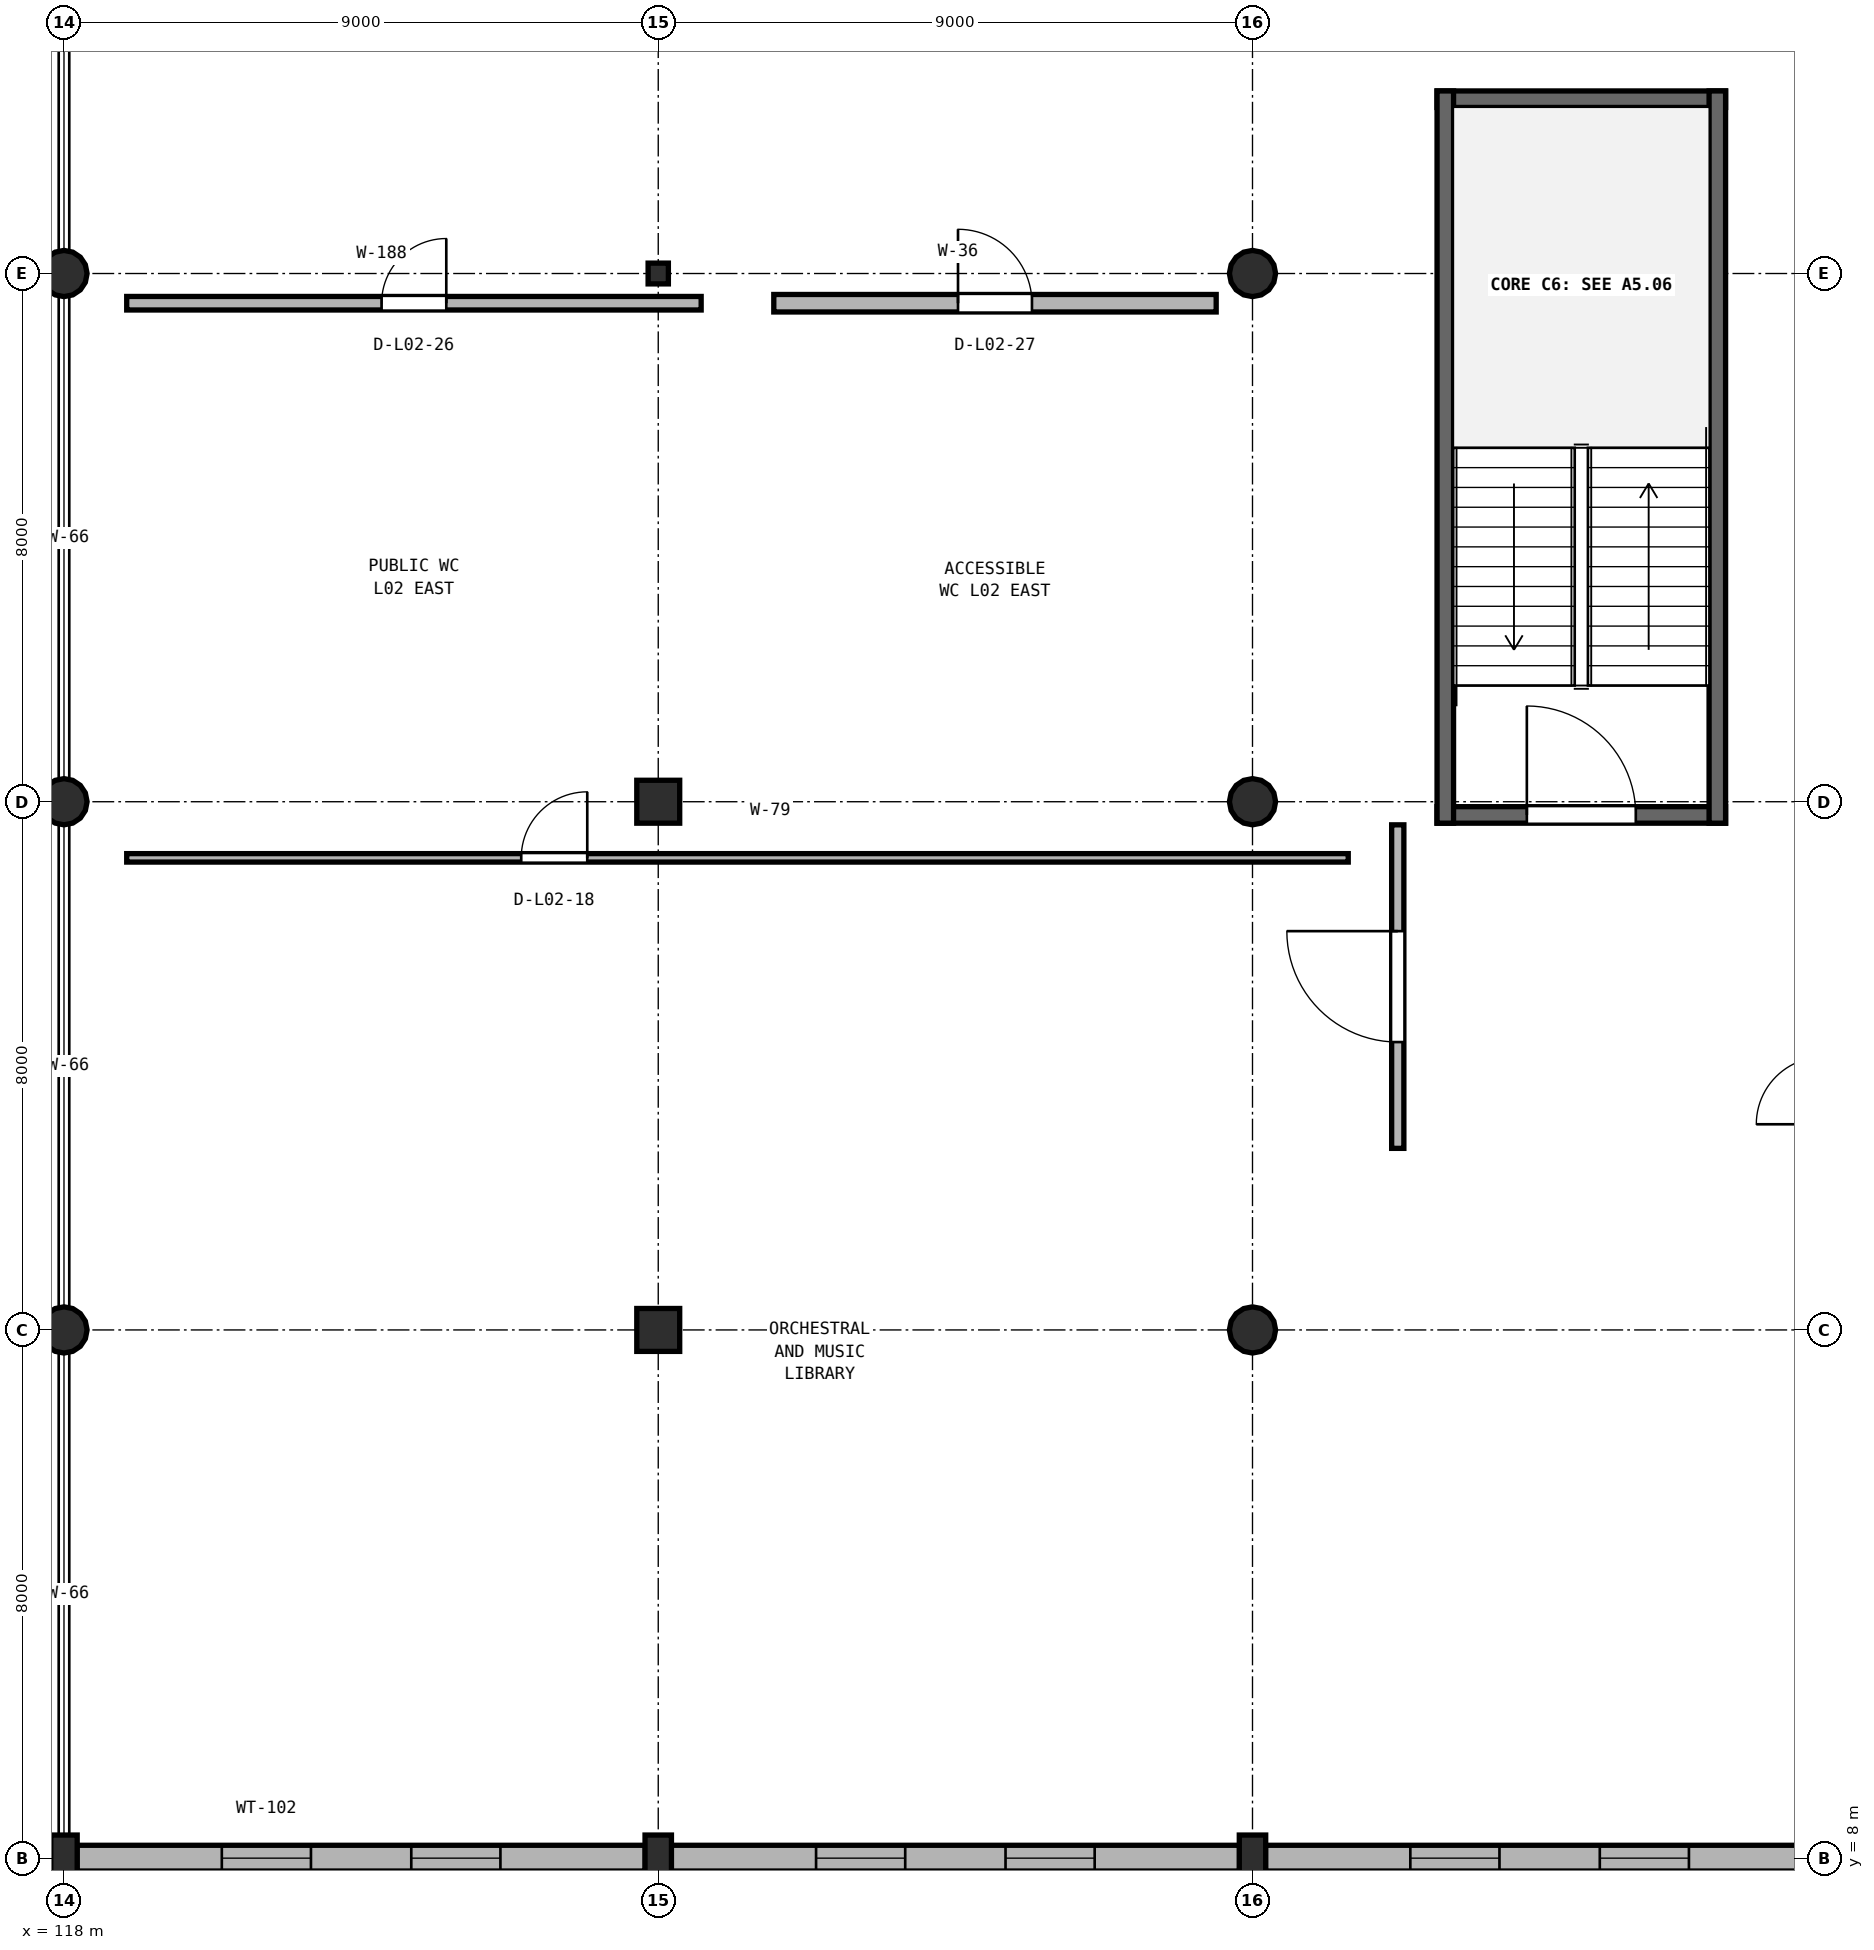
"""IFC4 building model, lengths in metres.
Left out: names, types, materials, properties, quantities, classifications, styles, units other than length and angle.
Written with IfcOpenShell. Run it as: python <this file> out.ifc"""

import sys

from ifc_helpers import new_model, si_unit, direction, frame, frame_2d, origin, origin_2d, place, context, subcontext, project, spatial, rectangle, circle, i_section, extrude, element, fill, save


model = new_model("IFC4")
c1 = context("Model", 3, precision=1e-05, world=origin(), true_north=direction((0.0, 1.0)))
c2 = subcontext(c1, "Body", "Model", "MODEL_VIEW")
j1 = project(units=[si_unit("LENGTHUNIT", "METRE"), si_unit("PLANEANGLEUNIT", "RADIAN")], contexts=[c1])
p1 = place(None, origin())
s1 = spatial("IfcSite", under=j1, at=p1, CompositionType="ELEMENT")
p2 = place(p1, origin())
s2 = spatial("IfcBuilding", under=s1, at=p2, CompositionType="ELEMENT")
p3 = place(p2, frame((0.0, 0.0, 10.2)))
s3 = spatial("IfcBuildingStorey", under=s2, at=p3, CompositionType="ELEMENT", Elevation=10.2)
p4 = place(p3, frame((118.0, 8.0, 0.0), z_axis=(0.0, 0.0, 1.0), x_axis=(1.0, 0.0, 0.0)))
e1 = element("IfcColumn", 1, at=p4, inside=s3, PredefinedType="PILASTER", context=c2, shape_type="SweptSolid", body=[
    extrude(rectangle(XDim=0.4, YDim=0.7, at=origin_2d()), origin(), (0.0, 0.0, 1.0), 4.24),
])
for number, where, z_axis, x_axis in (
    (2, (118.0, 16.0, 0.0), (0.0, 0.0, 1.0), (1.0, 0.0, 0.0)),
    (3, (118.0, 24.0, 0.0), (0.0, 0.0, 1.0), (1.0, 0.0, 0.0)),
    (4, (118.0, 32.0, 0.0), (0.0, 0.0, 1.0), (1.0, 0.0, 0.0)),
):
    element("IfcColumn", number, at=place(p3, frame(where, z_axis=z_axis, x_axis=x_axis)), inside=s3, PredefinedType="COLUMN", context=c2, shape_type="SweptSolid", body=[
        extrude(circle(Radius=0.35, at=origin_2d()), origin(), (0.0, 0.0, 1.0), 4.24),
    ])
p5 = place(p3, frame((127.0, 8.0, 0.0), z_axis=(0.0, 0.0, 1.0), x_axis=(1.0, 0.0, 0.0)))
e5 = element("IfcColumn", 5, at=p5, inside=s3, PredefinedType="PILASTER", context=c2, shape_type="SweptSolid", body=[
    extrude(rectangle(XDim=0.4, YDim=0.7, at=origin_2d()), origin(), (0.0, 0.0, 1.0), 4.24),
])
for number, where, z_axis, x_axis in (
    (6, (127.0, 16.0, 0.0), (0.0, 0.0, 1.0), (1.0, 0.0, 0.0)),
    (7, (127.0, 24.0, 0.0), (0.0, 0.0, 1.0), (1.0, 0.0, 0.0)),
):
    element("IfcColumn", number, at=place(p3, frame(where, z_axis=z_axis, x_axis=x_axis)), inside=s3, PredefinedType="COLUMN", context=c2, shape_type="SweptSolid", body=[
        extrude(rectangle(XDim=0.65, YDim=0.65, at=origin_2d()), origin(), (0.0, 0.0, 1.0), 4.24),
    ])
p6 = place(p3, frame((127.0, 32.0, 0.0), z_axis=(0.0, 0.0, 1.0), x_axis=(1.0, 0.0, 0.0)))
e8 = element("IfcColumn", 8, at=p6, inside=s3, PredefinedType="COLUMN", context=c2, shape_type="SweptSolid", body=[
    extrude(i_section(OverallWidth=0.307, OverallDepth=0.315, WebThickness=0.012, FlangeThickness=0.019, FilletRadius=0.017, at=origin_2d()), origin(), (0.0, 0.0, 1.0), 4.24),
])
p7 = place(p3, frame((136.0, 8.0, 0.0), z_axis=(0.0, 0.0, 1.0), x_axis=(1.0, 0.0, 0.0)))
e9 = element("IfcColumn", 9, at=p7, inside=s3, PredefinedType="PILASTER", context=c2, shape_type="SweptSolid", body=[
    extrude(rectangle(XDim=0.4, YDim=0.7, at=origin_2d()), origin(), (0.0, 0.0, 1.0), 4.24),
])
for number, where, z_axis, x_axis in (
    (10, (136.0, 16.0, 0.0), (0.0, 0.0, 1.0), (1.0, 0.0, 0.0)),
    (11, (136.0, 24.0, 0.0), (0.0, 0.0, 1.0), (1.0, 0.0, 0.0)),
    (12, (136.0, 32.0, 0.0), (0.0, 0.0, 1.0), (1.0, 0.0, 0.0)),
):
    element("IfcColumn", number, at=place(p3, frame(where, z_axis=z_axis, x_axis=x_axis)), inside=s3, PredefinedType="COLUMN", context=c2, shape_type="SweptSolid", body=[
        extrude(circle(Radius=0.35, at=origin_2d()), origin(), (0.0, 0.0, 1.0), 4.24),
    ])
p8 = place(p3, frame((118.196, 8.0, 0.0), z_axis=(0.0, 0.0, 1.0), x_axis=(1.0, 0.0, 0.0)))
e13 = element("IfcWall", 13, at=p8, inside=s3, PredefinedType="SOLIDWALL", context=c2, shape_type="SweptSolid", body=[
    extrude(rectangle(XDim=8.608, YDim=0.39, at=frame_2d((4.304, 0.0))), origin(), (0.0, 0.0, 1.0), 3.852),
])
p9 = place(p8, frame((2.194, 0.0, 0.75)))
e14 = element("IfcOpeningElement", 14, at=p9, cuts=e13, PredefinedType="OPENING", context=c2, shape_type="SweptSolid", body=[
    extrude(rectangle(XDim=1.35, YDim=2.15, at=frame_2d((0.675, 1.075))), frame((0.0, 0.205, 0.0), z_axis=(0.0, -1.0, 0.0), x_axis=(1.0, 0.0, 0.0)), (0.0, 0.0, 1.0), 0.41),
])
p10 = place(p8, frame((5.064, 0.0, 0.75)))
e15 = element("IfcOpeningElement", 15, at=p10, cuts=e13, PredefinedType="OPENING", context=c2, shape_type="SweptSolid", body=[
    extrude(rectangle(XDim=1.35, YDim=2.15, at=frame_2d((0.675, 1.075))), frame((0.0, 0.205, 0.0), z_axis=(0.0, -1.0, 0.0), x_axis=(1.0, 0.0, 0.0)), (0.0, 0.0, 1.0), 0.41),
])
p11 = place(p3, frame((127.196, 8.0, 0.0), z_axis=(0.0, 0.0, 1.0), x_axis=(1.0, 0.0, 0.0)))
e16 = element("IfcWall", 16, at=p11, inside=s3, PredefinedType="SOLIDWALL", context=c2, shape_type="SweptSolid", body=[
    extrude(rectangle(XDim=8.608, YDim=0.39, at=frame_2d((4.304, 0.0))), origin(), (0.0, 0.0, 1.0), 3.852),
])
p12 = place(p11, frame((2.194, 0.0, 0.75)))
e17 = element("IfcOpeningElement", 17, at=p12, cuts=e16, PredefinedType="OPENING", context=c2, shape_type="SweptSolid", body=[
    extrude(rectangle(XDim=1.35, YDim=2.15, at=frame_2d((0.675, 1.075))), frame((0.0, 0.205, 0.0), z_axis=(0.0, -1.0, 0.0), x_axis=(1.0, 0.0, 0.0)), (0.0, 0.0, 1.0), 0.41),
])
p13 = place(p11, frame((5.064, 0.0, 0.75)))
e18 = element("IfcOpeningElement", 18, at=p13, cuts=e16, PredefinedType="OPENING", context=c2, shape_type="SweptSolid", body=[
    extrude(rectangle(XDim=1.35, YDim=2.15, at=frame_2d((0.675, 1.075))), frame((0.0, 0.205, 0.0), z_axis=(0.0, -1.0, 0.0), x_axis=(1.0, 0.0, 0.0)), (0.0, 0.0, 1.0), 0.41),
])
p14 = place(p3, frame((136.196, 8.0, 0.0), z_axis=(0.0, 0.0, 1.0), x_axis=(1.0, 0.0, 0.0)))
e19 = element("IfcWall", 19, at=p14, inside=s3, PredefinedType="SOLIDWALL", context=c2, shape_type="SweptSolid", body=[
    extrude(rectangle(XDim=8.608, YDim=0.39, at=frame_2d((4.304, 0.0))), origin(), (0.0, 0.0, 1.0), 3.852),
])
p15 = place(p14, frame((2.194, 0.0, 0.75)))
e20 = element("IfcOpeningElement", 20, at=p15, cuts=e19, PredefinedType="OPENING", context=c2, shape_type="SweptSolid", body=[
    extrude(rectangle(XDim=1.35, YDim=2.15, at=frame_2d((0.675, 1.075))), frame((0.0, 0.205, 0.0), z_axis=(0.0, -1.0, 0.0), x_axis=(1.0, 0.0, 0.0)), (0.0, 0.0, 1.0), 0.41),
])
p16 = place(p14, frame((5.064, 0.0, 0.75)))
e21 = element("IfcOpeningElement", 21, at=p16, cuts=e19, PredefinedType="OPENING", context=c2, shape_type="SweptSolid", body=[
    extrude(rectangle(XDim=1.35, YDim=2.15, at=frame_2d((0.675, 1.075))), frame((0.0, 0.205, 0.0), z_axis=(0.0, -1.0, 0.0), x_axis=(1.0, 0.0, 0.0)), (0.0, 0.0, 1.0), 0.41),
])
p17 = place(p3, frame((138.795, 23.8, 0.0), z_axis=(0.0, 0.0, 1.0), x_axis=(1.0, 0.0, 0.0)))
e22 = element("IfcWall", 22, at=p17, inside=s3, PredefinedType="SHEAR", context=c2, shape_type="SweptSolid", body=[
    extrude(rectangle(XDim=4.37, YDim=0.25, at=frame_2d((2.185, 0.0))), origin(), (0.0, 0.0, 1.0), 4.24),
])
p18 = place(p17, frame((1.36, 0.0, 0.0)))
e23 = element("IfcOpeningElement", 23, at=p18, cuts=e22, PredefinedType="OPENING", context=c2, shape_type="SweptSolid", body=[
    extrude(rectangle(XDim=1.65, YDim=2.22, at=frame_2d((0.825, 1.11))), frame((0.0, 0.135, 0.0), z_axis=(0.0, -1.0, 0.0), x_axis=(1.0, 0.0, 0.0)), (0.0, 0.0, 1.0), 0.27),
])
p19 = place(p3, frame((138.795, 34.64, 0.0), z_axis=(0.0, 0.0, 1.0), x_axis=(1.0, 0.0, 0.0)))
e24 = element("IfcWall", 24, at=p19, inside=s3, PredefinedType="SHEAR", context=c2, shape_type="SweptSolid", body=[
    extrude(rectangle(XDim=4.37, YDim=0.25, at=frame_2d((2.185, 0.0))), origin(), (0.0, 0.0, 1.0), 4.24),
])
for number, where, z_axis, x_axis in (
    (25, (138.92, 23.675, 0.0), (0.0, 0.0, 1.0), (0.0, 1.0, 0.0)),
    (26, (143.04, 23.675, 0.0), (0.0, 0.0, 1.0), (0.0, 1.0, 0.0)),
):
    element("IfcWall", number, at=place(p3, frame(where, z_axis=z_axis, x_axis=x_axis)), inside=s3, PredefinedType="SHEAR", context=c2, shape_type="SweptSolid", body=[
        extrude(rectangle(XDim=11.09, YDim=0.25, at=frame_2d((5.545, 0.0))), origin(), (0.0, 0.0, 1.0), 4.24),
    ])
p20 = place(p3, frame((138.2, 18.75, 0.0), z_axis=(0.0, 0.0, 1.0), x_axis=(0.0, 1.0, 0.0)))
e27 = element("IfcWall", 27, at=p20, inside=s3, PredefinedType="PARTITIONING", context=c2, shape_type="SweptSolid", body=[
    extrude(rectangle(XDim=4.9, YDim=0.185, at=frame_2d((2.45, 0.0))), origin(), (0.0, 0.0, 1.0), 4.19),
])
p21 = place(p20, frame((1.61, 0.0, 0.0)))
e28 = element("IfcOpeningElement", 28, at=p21, cuts=e27, PredefinedType="OPENING", context=c2, shape_type="SweptSolid", body=[
    extrude(rectangle(XDim=1.68, YDim=2.25, at=frame_2d((0.84, 1.125))), frame((0.0, 0.103, 0.0), z_axis=(0.0, -1.0, 0.0), x_axis=(1.0, 0.0, 0.0)), (0.0, 0.0, 1.0), 0.205),
])
p22 = place(p3, frame((118.95, 23.15, 0.0), z_axis=(0.0, 0.0, 1.0), x_axis=(1.0, 0.0, 0.0)))
e29 = element("IfcWall", 29, at=p22, inside=s3, PredefinedType="PARTITIONING", context=c2, shape_type="SweptSolid", body=[
    extrude(rectangle(XDim=18.5, YDim=0.128, at=frame_2d((9.25, 0.0))), origin(), (0.0, 0.0, 1.0), 4.19),
])
p23 = place(p22, frame((5.975, 0.0, 0.0)))
e30 = element("IfcOpeningElement", 30, at=p23, cuts=e29, PredefinedType="OPENING", context=c2, shape_type="SweptSolid", body=[
    extrude(rectangle(XDim=1.0, YDim=2.15, at=frame_2d((0.5, 1.075))), frame((0.0, 0.074, 0.0), z_axis=(0.0, -1.0, 0.0), x_axis=(1.0, 0.0, 0.0)), (0.0, 0.0, 1.0), 0.148),
])
p24 = place(p3, frame((118.95, 31.55, 0.0), z_axis=(0.0, 0.0, 1.0), x_axis=(1.0, 0.0, 0.0)))
e31 = element("IfcWall", 31, at=p24, inside=s3, PredefinedType="PLUMBINGWALL", context=c2, shape_type="SweptSolid", body=[
    extrude(rectangle(XDim=8.7, YDim=0.205, at=frame_2d((4.35, 0.0))), origin(), (0.0, 0.0, 1.0), 3.603),
])
p25 = place(p24, frame((3.86, 0.0, 0.0)))
e32 = element("IfcOpeningElement", 32, at=p25, cuts=e31, PredefinedType="OPENING", context=c2, shape_type="SweptSolid", body=[
    extrude(rectangle(XDim=0.98, YDim=2.14, at=frame_2d((0.49, 1.07))), frame((0.0, 0.113, 0.0), z_axis=(0.0, -1.0, 0.0), x_axis=(1.0, 0.0, 0.0)), (0.0, 0.0, 1.0), 0.225),
])
p26 = place(p3, frame((128.75, 31.55, 0.0), z_axis=(0.0, 0.0, 1.0), x_axis=(1.0, 0.0, 0.0)))
e33 = element("IfcWall", 33, at=p26, inside=s3, PredefinedType="PLUMBINGWALL", context=c2, shape_type="SweptSolid", body=[
    extrude(rectangle(XDim=6.7, YDim=0.265, at=frame_2d((3.35, 0.0))), origin(), (0.0, 0.0, 1.0), 3.603),
])
p27 = place(p26, frame((2.79, 0.0, 0.0)))
e34 = element("IfcOpeningElement", 34, at=p27, cuts=e33, PredefinedType="OPENING", context=c2, shape_type="SweptSolid", body=[
    extrude(rectangle(XDim=1.12, YDim=2.16, at=frame_2d((0.56, 1.08))), frame((0.0, 0.142, 0.0), z_axis=(0.0, -1.0, 0.0), x_axis=(1.0, 0.0, 0.0)), (0.0, 0.0, 1.0), 0.285),
])
p28 = place(p9, origin())
e35 = element("IfcWindow", 35, at=p28, inside=s3, PartitioningType="SINGLE_PANEL", PredefinedType="WINDOW", context=c2, shape_type="SweptSolid", body=[
    extrude(rectangle(XDim=1.35, YDim=2.15, at=frame_2d((0.675, 1.075))), frame((0.0, 0.03, 0.0), z_axis=(0.0, -1.0, 0.0), x_axis=(1.0, 0.0, 0.0)), (0.0, 0.0, 1.0), 0.06),
])
fill(e14, e35)
p29 = place(p10, origin())
e36 = element("IfcWindow", 36, at=p29, inside=s3, PartitioningType="SINGLE_PANEL", PredefinedType="WINDOW", context=c2, shape_type="SweptSolid", body=[
    extrude(rectangle(XDim=1.35, YDim=2.15, at=frame_2d((0.675, 1.075))), frame((0.0, 0.03, 0.0), z_axis=(0.0, -1.0, 0.0), x_axis=(1.0, 0.0, 0.0)), (0.0, 0.0, 1.0), 0.06),
])
fill(e15, e36)
p30 = place(p12, origin())
e37 = element("IfcWindow", 37, at=p30, inside=s3, PartitioningType="SINGLE_PANEL", PredefinedType="WINDOW", context=c2, shape_type="SweptSolid", body=[
    extrude(rectangle(XDim=1.35, YDim=2.15, at=frame_2d((0.675, 1.075))), frame((0.0, 0.03, 0.0), z_axis=(0.0, -1.0, 0.0), x_axis=(1.0, 0.0, 0.0)), (0.0, 0.0, 1.0), 0.06),
])
fill(e17, e37)
p31 = place(p13, origin())
e38 = element("IfcWindow", 38, at=p31, inside=s3, PartitioningType="SINGLE_PANEL", PredefinedType="WINDOW", context=c2, shape_type="SweptSolid", body=[
    extrude(rectangle(XDim=1.35, YDim=2.15, at=frame_2d((0.675, 1.075))), frame((0.0, 0.03, 0.0), z_axis=(0.0, -1.0, 0.0), x_axis=(1.0, 0.0, 0.0)), (0.0, 0.0, 1.0), 0.06),
])
fill(e18, e38)
p32 = place(p15, origin())
e39 = element("IfcWindow", 39, at=p32, inside=s3, PartitioningType="SINGLE_PANEL", PredefinedType="WINDOW", context=c2, shape_type="SweptSolid", body=[
    extrude(rectangle(XDim=1.35, YDim=2.15, at=frame_2d((0.675, 1.075))), frame((0.0, 0.03, 0.0), z_axis=(0.0, -1.0, 0.0), x_axis=(1.0, 0.0, 0.0)), (0.0, 0.0, 1.0), 0.06),
])
fill(e20, e39)
p33 = place(p16, origin())
e40 = element("IfcWindow", 40, at=p33, inside=s3, PartitioningType="SINGLE_PANEL", PredefinedType="WINDOW", context=c2, shape_type="SweptSolid", body=[
    extrude(rectangle(XDim=1.35, YDim=2.15, at=frame_2d((0.675, 1.075))), frame((0.0, 0.03, 0.0), z_axis=(0.0, -1.0, 0.0), x_axis=(1.0, 0.0, 0.0)), (0.0, 0.0, 1.0), 0.06),
])
fill(e21, e40)
p34 = place(p18, origin())
e41 = element("IfcDoor", 41, at=p34, inside=s3, OperationType="SINGLE_SWING_LEFT", PredefinedType="DOOR", context=c2, shape_type="SweptSolid", body=[
    extrude(rectangle(XDim=1.65, YDim=2.22, at=frame_2d((0.825, 1.11))), frame((0.0, 0.025, 0.0), z_axis=(0.0, -1.0, 0.0), x_axis=(1.0, 0.0, 0.0)), (0.0, 0.0, 1.0), 0.05),
])
fill(e23, e41)
p35 = place(p21, origin())
e42 = element("IfcDoor", 42, at=p35, inside=s3, OperationType="SINGLE_SWING_RIGHT", PredefinedType="DOOR", context=c2, shape_type="SweptSolid", body=[
    extrude(rectangle(XDim=1.68, YDim=2.25, at=frame_2d((0.84, 1.125))), frame((0.0, 0.025, 0.0), z_axis=(0.0, -1.0, 0.0), x_axis=(1.0, 0.0, 0.0)), (0.0, 0.0, 1.0), 0.05),
])
fill(e28, e42)
p36 = place(p23, origin())
e43 = element("IfcDoor", 43, at=p36, inside=s3, OperationType="SINGLE_SWING_RIGHT", PredefinedType="DOOR", context=c2, shape_type="SweptSolid", body=[
    extrude(rectangle(XDim=1.0, YDim=2.15, at=frame_2d((0.5, 1.075))), frame((0.0, 0.025, 0.0), z_axis=(0.0, -1.0, 0.0), x_axis=(1.0, 0.0, 0.0)), (0.0, 0.0, 1.0), 0.05),
])
fill(e30, e43)
p37 = place(p25, origin())
e44 = element("IfcDoor", 44, at=p37, inside=s3, OperationType="SINGLE_SWING_RIGHT", PredefinedType="DOOR", context=c2, shape_type="SweptSolid", body=[
    extrude(rectangle(XDim=0.98, YDim=2.14, at=frame_2d((0.49, 1.07))), frame((0.0, 0.025, 0.0), z_axis=(0.0, -1.0, 0.0), x_axis=(1.0, 0.0, 0.0)), (0.0, 0.0, 1.0), 0.05),
])
fill(e32, e44)
p38 = place(p27, origin())
e45 = element("IfcDoor", 45, at=p38, inside=s3, OperationType="SINGLE_SWING_LEFT", PredefinedType="DOOR", context=c2, shape_type="SweptSolid", body=[
    extrude(rectangle(XDim=1.12, YDim=2.16, at=frame_2d((0.56, 1.08))), frame((0.0, 0.025, 0.0), z_axis=(0.0, -1.0, 0.0), x_axis=(1.0, 0.0, 0.0)), (0.0, 0.0, 1.0), 0.05),
])
fill(e34, e45)
save(model, sys.argv[1])
